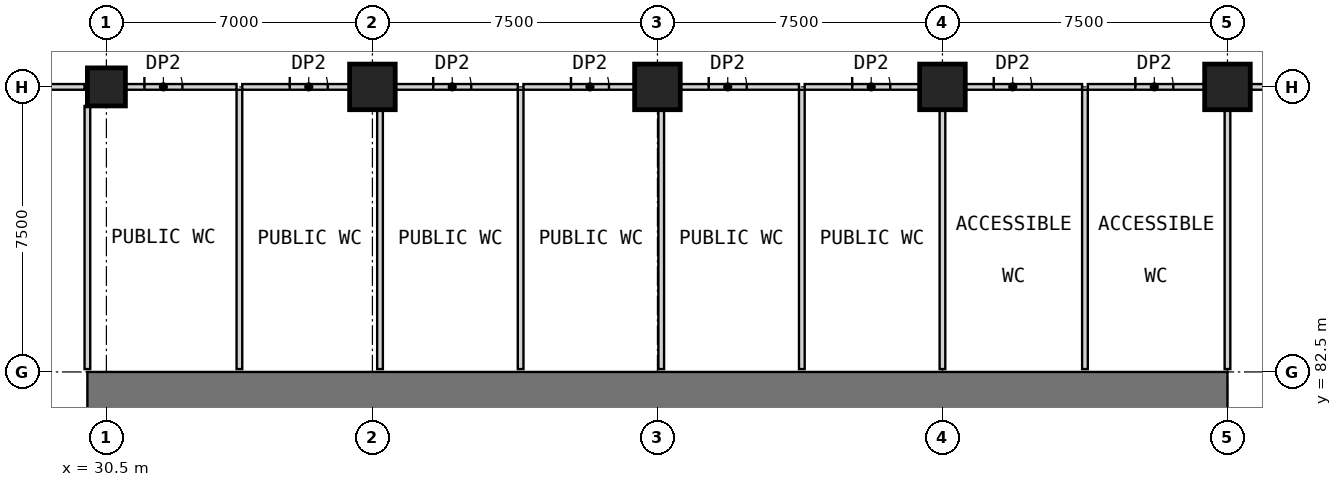
"""IFC4 building model, lengths in metres.
Left out: names, types, materials, properties, quantities, classifications, styles, units other than length and angle.
Written with IfcOpenShell. Run it as: python <this file> out.ifc"""

import sys

from ifc_helpers import new_model, si_unit, direction, frame, frame_2d, origin, origin_2d, place, context, subcontext, project, spatial, rectangle, extrude, element, fill, save


model = new_model("IFC4")
c1 = context("Model", 3, precision=1e-05, world=origin(), true_north=direction((0.0, 1.0)))
c2 = subcontext(c1, "Body", "Model", "MODEL_VIEW")
j1 = project(units=[si_unit("LENGTHUNIT", "METRE"), si_unit("PLANEANGLEUNIT", "RADIAN")], contexts=[c1])
p1 = place(None, origin())
s1 = spatial("IfcSite", under=j1, at=p1, CompositionType="ELEMENT")
p2 = place(p1, origin())
s2 = spatial("IfcBuilding", under=s1, at=p2, CompositionType="ELEMENT")
p3 = place(p2, frame((0.0, 0.0, 18.5)))
s3 = spatial("IfcBuildingStorey", under=s2, at=p3, CompositionType="ELEMENT", Elevation=18.5)
p4 = place(p3, frame((30.5, 90.0, 0.0), z_axis=(0.0, 0.0, 1.0), x_axis=(1.0, 0.0, 0.0)))
e1 = element("IfcColumn", 1, at=p4, inside=s3, PredefinedType="COLUMN", context=c2, shape_type="SweptSolid", body=[
    extrude(rectangle(XDim=1.0, YDim=1.0, at=origin_2d()), origin(), (0.0, 0.0, 1.0), 5.0),
])
for number, where, z_axis, x_axis in (
    (2, (37.5, 90.0, 0.0), (0.0, 0.0, 1.0), (1.0, 0.0, 0.0)),
    (3, (45.0, 90.0, 0.0), (0.0, 0.0, 1.0), (1.0, 0.0, 0.0)),
    (4, (52.5, 90.0, 0.0), (0.0, 0.0, 1.0), (1.0, 0.0, 0.0)),
    (5, (60.0, 90.0, 0.0), (0.0, 0.0, 1.0), (1.0, 0.0, 0.0)),
):
    element("IfcColumn", number, at=place(p3, frame(where, z_axis=z_axis, x_axis=x_axis)), inside=s3, PredefinedType="COLUMN", context=c2, shape_type="SweptSolid", body=[
        extrude(rectangle(XDim=1.2, YDim=1.2, at=origin_2d()), origin(), (0.0, 0.0, 1.0), 5.0),
    ])
p5 = place(p3, frame((30.0, 82.0, 0.0), z_axis=(0.0, 0.0, 1.0), x_axis=(1.0, 0.0, 0.0)))
e6 = element("IfcWall", 6, at=p5, inside=s3, PredefinedType="SHEAR", context=c2, shape_type="SweptSolid", body=[
    extrude(rectangle(XDim=30.0, YDim=1.0, at=frame_2d((15.0, 0.0))), origin(), (0.0, 0.0, 1.0), 5.0),
])
p6 = place(p3, frame((23.6, 90.0, 0.0), z_axis=(0.0, 0.0, 1.0), x_axis=(1.0, 0.0, 0.0)))
e7 = element("IfcWall", 7, at=p6, inside=s3, PredefinedType="PARTITIONING", context=c2, shape_type="SweptSolid", body=[
    extrude(rectangle(XDim=6.325, YDim=0.15, at=frame_2d((3.163, 0.0))), origin(), (0.0, 0.0, 1.0), 4.7),
])
p7 = place(p3, frame((31.0, 90.0, 0.0), z_axis=(0.0, 0.0, 1.0), x_axis=(1.0, 0.0, 0.0)))
e8 = element("IfcWall", 8, at=p7, inside=s3, PredefinedType="PARTITIONING", context=c2, shape_type="SweptSolid", body=[
    extrude(rectangle(XDim=2.925, YDim=0.15, at=frame_2d((1.462, 0.0))), origin(), (0.0, 0.0, 1.0), 4.7),
])
p8 = place(p7, frame((0.5, 0.0, 0.0)))
e9 = element("IfcOpeningElement", 9, at=p8, cuts=e8, PredefinedType="OPENING", context=c2, shape_type="SweptSolid", body=[
    extrude(rectangle(XDim=1.0, YDim=2.1, at=frame_2d((0.5, 1.05))), frame((0.0, 0.085, 0.0), z_axis=(0.0, -1.0, 0.0), x_axis=(1.0, 0.0, 0.0)), (0.0, 0.0, 1.0), 0.17),
])
p9 = place(p3, frame((34.075, 90.0, 0.0), z_axis=(0.0, 0.0, 1.0), x_axis=(1.0, 0.0, 0.0)))
e10 = element("IfcWall", 10, at=p9, inside=s3, PredefinedType="PARTITIONING", context=c2, shape_type="SweptSolid", body=[
    extrude(rectangle(XDim=2.825, YDim=0.15, at=frame_2d((1.413, 0.0))), origin(), (0.0, 0.0, 1.0), 4.7),
])
p10 = place(p9, frame((1.25, 0.0, 0.0)))
e11 = element("IfcOpeningElement", 11, at=p10, cuts=e10, PredefinedType="OPENING", context=c2, shape_type="SweptSolid", body=[
    extrude(rectangle(XDim=1.0, YDim=2.1, at=frame_2d((0.5, 1.05))), frame((0.0, 0.085, 0.0), z_axis=(0.0, -1.0, 0.0), x_axis=(1.0, 0.0, 0.0)), (0.0, 0.0, 1.0), 0.17),
])
p11 = place(p3, frame((38.1, 90.0, 0.0), z_axis=(0.0, 0.0, 1.0), x_axis=(1.0, 0.0, 0.0)))
e12 = element("IfcWall", 12, at=p11, inside=s3, PredefinedType="PARTITIONING", context=c2, shape_type="SweptSolid", body=[
    extrude(rectangle(XDim=3.225, YDim=0.15, at=frame_2d((1.612, 0.0))), origin(), (0.0, 0.0, 1.0), 4.7),
])
p12 = place(p11, frame((1.0, 0.0, 0.0)))
e13 = element("IfcOpeningElement", 13, at=p12, cuts=e12, PredefinedType="OPENING", context=c2, shape_type="SweptSolid", body=[
    extrude(rectangle(XDim=1.0, YDim=2.1, at=frame_2d((0.5, 1.05))), frame((0.0, 0.085, 0.0), z_axis=(0.0, -1.0, 0.0), x_axis=(1.0, 0.0, 0.0)), (0.0, 0.0, 1.0), 0.17),
])
p13 = place(p3, frame((41.475, 90.0, 0.0), z_axis=(0.0, 0.0, 1.0), x_axis=(1.0, 0.0, 0.0)))
e14 = element("IfcWall", 14, at=p13, inside=s3, PredefinedType="PARTITIONING", context=c2, shape_type="SweptSolid", body=[
    extrude(rectangle(XDim=2.925, YDim=0.15, at=frame_2d((1.462, 0.0))), origin(), (0.0, 0.0, 1.0), 4.7),
])
p14 = place(p13, frame((1.25, 0.0, 0.0)))
e15 = element("IfcOpeningElement", 15, at=p14, cuts=e14, PredefinedType="OPENING", context=c2, shape_type="SweptSolid", body=[
    extrude(rectangle(XDim=1.0, YDim=2.1, at=frame_2d((0.5, 1.05))), frame((0.0, 0.085, 0.0), z_axis=(0.0, -1.0, 0.0), x_axis=(1.0, 0.0, 0.0)), (0.0, 0.0, 1.0), 0.17),
])
p15 = place(p3, frame((45.6, 90.0, 0.0), z_axis=(0.0, 0.0, 1.0), x_axis=(1.0, 0.0, 0.0)))
e16 = element("IfcWall", 16, at=p15, inside=s3, PredefinedType="PARTITIONING", context=c2, shape_type="SweptSolid", body=[
    extrude(rectangle(XDim=3.125, YDim=0.15, at=frame_2d((1.562, 0.0))), origin(), (0.0, 0.0, 1.0), 4.7),
])
p16 = place(p15, frame((0.75, 0.0, 0.0)))
e17 = element("IfcOpeningElement", 17, at=p16, cuts=e16, PredefinedType="OPENING", context=c2, shape_type="SweptSolid", body=[
    extrude(rectangle(XDim=1.0, YDim=2.1, at=frame_2d((0.5, 1.05))), frame((0.0, 0.085, 0.0), z_axis=(0.0, -1.0, 0.0), x_axis=(1.0, 0.0, 0.0)), (0.0, 0.0, 1.0), 0.17),
])
p17 = place(p3, frame((48.875, 90.0, 0.0), z_axis=(0.0, 0.0, 1.0), x_axis=(1.0, 0.0, 0.0)))
e18 = element("IfcWall", 18, at=p17, inside=s3, PredefinedType="PARTITIONING", context=c2, shape_type="SweptSolid", body=[
    extrude(rectangle(XDim=3.025, YDim=0.15, at=frame_2d((1.512, 0.0))), origin(), (0.0, 0.0, 1.0), 4.7),
])
p18 = place(p17, frame((1.25, 0.0, 0.0)))
e19 = element("IfcOpeningElement", 19, at=p18, cuts=e18, PredefinedType="OPENING", context=c2, shape_type="SweptSolid", body=[
    extrude(rectangle(XDim=1.0, YDim=2.1, at=frame_2d((0.5, 1.05))), frame((0.0, 0.085, 0.0), z_axis=(0.0, -1.0, 0.0), x_axis=(1.0, 0.0, 0.0)), (0.0, 0.0, 1.0), 0.17),
])
p19 = place(p3, frame((53.1, 90.0, 0.0), z_axis=(0.0, 0.0, 1.0), x_axis=(1.0, 0.0, 0.0)))
e20 = element("IfcWall", 20, at=p19, inside=s3, PredefinedType="PARTITIONING", context=c2, shape_type="SweptSolid", body=[
    extrude(rectangle(XDim=3.075, YDim=0.15, at=frame_2d((1.538, 0.0))), origin(), (0.0, 0.0, 1.0), 4.7),
])
p20 = place(p19, frame((0.75, 0.0, 0.0)))
e21 = element("IfcOpeningElement", 21, at=p20, cuts=e20, PredefinedType="OPENING", context=c2, shape_type="SweptSolid", body=[
    extrude(rectangle(XDim=1.0, YDim=2.1, at=frame_2d((0.5, 1.05))), frame((0.0, 0.085, 0.0), z_axis=(0.0, -1.0, 0.0), x_axis=(1.0, 0.0, 0.0)), (0.0, 0.0, 1.0), 0.17),
])
p21 = place(p3, frame((56.325, 90.0, 0.0), z_axis=(0.0, 0.0, 1.0), x_axis=(1.0, 0.0, 0.0)))
e22 = element("IfcWall", 22, at=p21, inside=s3, PredefinedType="PARTITIONING", context=c2, shape_type="SweptSolid", body=[
    extrude(rectangle(XDim=3.075, YDim=0.15, at=frame_2d((1.538, 0.0))), origin(), (0.0, 0.0, 1.0), 4.7),
])
p22 = place(p21, frame((1.25, 0.0, 0.0)))
e23 = element("IfcOpeningElement", 23, at=p22, cuts=e22, PredefinedType="OPENING", context=c2, shape_type="SweptSolid", body=[
    extrude(rectangle(XDim=1.0, YDim=2.1, at=frame_2d((0.5, 1.05))), frame((0.0, 0.085, 0.0), z_axis=(0.0, -1.0, 0.0), x_axis=(1.0, 0.0, 0.0)), (0.0, 0.0, 1.0), 0.17),
])
p23 = place(p3, frame((60.6, 90.0, 0.0), z_axis=(0.0, 0.0, 1.0), x_axis=(1.0, 0.0, 0.0)))
e24 = element("IfcWall", 24, at=p23, inside=s3, PredefinedType="PARTITIONING", context=c2, shape_type="SweptSolid", body=[
    extrude(rectangle(XDim=6.3, YDim=0.15, at=frame_2d((3.15, 0.0))), origin(), (0.0, 0.0, 1.0), 4.7),
])
p24 = place(p23, frame((3.5, 0.0, 0.0)))
e25 = element("IfcOpeningElement", 25, at=p24, cuts=e24, PredefinedType="OPENING", context=c2, shape_type="SweptSolid", body=[
    extrude(rectangle(XDim=1.8, YDim=2.4, at=frame_2d((0.9, 1.2))), frame((0.0, 0.085, 0.0), z_axis=(0.0, -1.0, 0.0), x_axis=(1.0, 0.0, 0.0)), (0.0, 0.0, 1.0), 0.17),
])
p25 = place(p3, frame((56.25, 82.575, 0.0), z_axis=(0.0, 0.0, 1.0), x_axis=(0.0, 1.0, 0.0)))
e26 = element("IfcWall", 26, at=p25, inside=s3, PredefinedType="PARTITIONING", context=c2, shape_type="SweptSolid", body=[
    extrude(rectangle(XDim=7.35, YDim=0.15, at=frame_2d((3.675, 0.0))), origin(), (0.0, 0.0, 1.0), 4.7),
])
p26 = place(p3, frame((52.5, 82.575, 0.0), z_axis=(0.0, 0.0, 1.0), x_axis=(0.0, 1.0, 0.0)))
e27 = element("IfcWall", 27, at=p26, inside=s3, PredefinedType="PARTITIONING", context=c2, shape_type="SweptSolid", body=[
    extrude(rectangle(XDim=6.825, YDim=0.15, at=frame_2d((3.413, 0.0))), origin(), (0.0, 0.0, 1.0), 4.7),
])
p27 = place(p3, frame((34.0, 82.575, 0.0), z_axis=(0.0, 0.0, 1.0), x_axis=(0.0, 1.0, 0.0)))
e28 = element("IfcWall", 28, at=p27, inside=s3, PredefinedType="PARTITIONING", context=c2, shape_type="SweptSolid", body=[
    extrude(rectangle(XDim=7.35, YDim=0.15, at=frame_2d((3.675, 0.0))), origin(), (0.0, 0.0, 1.0), 4.7),
])
p28 = place(p3, frame((30.0, 82.575, 0.0), z_axis=(0.0, 0.0, 1.0), x_axis=(0.0, 1.0, 0.0)))
e29 = element("IfcWall", 29, at=p28, inside=s3, PredefinedType="PARTITIONING", context=c2, shape_type="SweptSolid", body=[
    extrude(rectangle(XDim=6.925, YDim=0.15, at=frame_2d((3.462, 0.0))), origin(), (0.0, 0.0, 1.0), 4.7),
])
p29 = place(p3, frame((37.7, 82.575, 0.0), z_axis=(0.0, 0.0, 1.0), x_axis=(0.0, 1.0, 0.0)))
e30 = element("IfcWall", 30, at=p29, inside=s3, PredefinedType="PARTITIONING", context=c2, shape_type="SweptSolid", body=[
    extrude(rectangle(XDim=6.825, YDim=0.15, at=frame_2d((3.413, 0.0))), origin(), (0.0, 0.0, 1.0), 4.7),
])
p30 = place(p3, frame((41.4, 82.575, 0.0), z_axis=(0.0, 0.0, 1.0), x_axis=(0.0, 1.0, 0.0)))
e31 = element("IfcWall", 31, at=p30, inside=s3, PredefinedType="PARTITIONING", context=c2, shape_type="SweptSolid", body=[
    extrude(rectangle(XDim=7.35, YDim=0.15, at=frame_2d((3.675, 0.0))), origin(), (0.0, 0.0, 1.0), 4.7),
])
p31 = place(p3, frame((45.1, 82.575, 0.0), z_axis=(0.0, 0.0, 1.0), x_axis=(0.0, 1.0, 0.0)))
e32 = element("IfcWall", 32, at=p31, inside=s3, PredefinedType="PARTITIONING", context=c2, shape_type="SweptSolid", body=[
    extrude(rectangle(XDim=6.825, YDim=0.15, at=frame_2d((3.413, 0.0))), origin(), (0.0, 0.0, 1.0), 4.7),
])
p32 = place(p3, frame((48.8, 82.575, 0.0), z_axis=(0.0, 0.0, 1.0), x_axis=(0.0, 1.0, 0.0)))
e33 = element("IfcWall", 33, at=p32, inside=s3, PredefinedType="PARTITIONING", context=c2, shape_type="SweptSolid", body=[
    extrude(rectangle(XDim=7.35, YDim=0.15, at=frame_2d((3.675, 0.0))), origin(), (0.0, 0.0, 1.0), 4.7),
])
p33 = place(p3, frame((60.0, 82.575, 0.0), z_axis=(0.0, 0.0, 1.0), x_axis=(0.0, 1.0, 0.0)))
e34 = element("IfcWall", 34, at=p33, inside=s3, PredefinedType="PARTITIONING", context=c2, shape_type="SweptSolid", body=[
    extrude(rectangle(XDim=6.825, YDim=0.15, at=frame_2d((3.413, 0.0))), origin(), (0.0, 0.0, 1.0), 4.7),
])
p34 = place(p8, origin())
e35 = element("IfcDoor", 35, at=p34, inside=s3, OperationType="SINGLE_SWING_LEFT", PredefinedType="DOOR", context=c2, shape_type="SweptSolid", body=[
    extrude(rectangle(XDim=1.0, YDim=2.1, at=frame_2d((0.5, 1.05))), frame((0.0, 0.025, 0.0), z_axis=(0.0, -1.0, 0.0), x_axis=(1.0, 0.0, 0.0)), (0.0, 0.0, 1.0), 0.05),
])
fill(e9, e35)
p35 = place(p10, origin())
e36 = element("IfcDoor", 36, at=p35, inside=s3, OperationType="SINGLE_SWING_LEFT", PredefinedType="DOOR", context=c2, shape_type="SweptSolid", body=[
    extrude(rectangle(XDim=1.0, YDim=2.1, at=frame_2d((0.5, 1.05))), frame((0.0, 0.025, 0.0), z_axis=(0.0, -1.0, 0.0), x_axis=(1.0, 0.0, 0.0)), (0.0, 0.0, 1.0), 0.05),
])
fill(e11, e36)
p36 = place(p12, origin())
e37 = element("IfcDoor", 37, at=p36, inside=s3, OperationType="SINGLE_SWING_LEFT", PredefinedType="DOOR", context=c2, shape_type="SweptSolid", body=[
    extrude(rectangle(XDim=1.0, YDim=2.1, at=frame_2d((0.5, 1.05))), frame((0.0, 0.025, 0.0), z_axis=(0.0, -1.0, 0.0), x_axis=(1.0, 0.0, 0.0)), (0.0, 0.0, 1.0), 0.05),
])
fill(e13, e37)
p37 = place(p14, origin())
e38 = element("IfcDoor", 38, at=p37, inside=s3, OperationType="SINGLE_SWING_LEFT", PredefinedType="DOOR", context=c2, shape_type="SweptSolid", body=[
    extrude(rectangle(XDim=1.0, YDim=2.1, at=frame_2d((0.5, 1.05))), frame((0.0, 0.025, 0.0), z_axis=(0.0, -1.0, 0.0), x_axis=(1.0, 0.0, 0.0)), (0.0, 0.0, 1.0), 0.05),
])
fill(e15, e38)
p38 = place(p16, origin())
e39 = element("IfcDoor", 39, at=p38, inside=s3, OperationType="SINGLE_SWING_LEFT", PredefinedType="DOOR", context=c2, shape_type="SweptSolid", body=[
    extrude(rectangle(XDim=1.0, YDim=2.1, at=frame_2d((0.5, 1.05))), frame((0.0, 0.025, 0.0), z_axis=(0.0, -1.0, 0.0), x_axis=(1.0, 0.0, 0.0)), (0.0, 0.0, 1.0), 0.05),
])
fill(e17, e39)
p39 = place(p18, origin())
e40 = element("IfcDoor", 40, at=p39, inside=s3, OperationType="SINGLE_SWING_LEFT", PredefinedType="DOOR", context=c2, shape_type="SweptSolid", body=[
    extrude(rectangle(XDim=1.0, YDim=2.1, at=frame_2d((0.5, 1.05))), frame((0.0, 0.025, 0.0), z_axis=(0.0, -1.0, 0.0), x_axis=(1.0, 0.0, 0.0)), (0.0, 0.0, 1.0), 0.05),
])
fill(e19, e40)
p40 = place(p20, origin())
e41 = element("IfcDoor", 41, at=p40, inside=s3, OperationType="SINGLE_SWING_LEFT", PredefinedType="DOOR", context=c2, shape_type="SweptSolid", body=[
    extrude(rectangle(XDim=1.0, YDim=2.1, at=frame_2d((0.5, 1.05))), frame((0.0, 0.025, 0.0), z_axis=(0.0, -1.0, 0.0), x_axis=(1.0, 0.0, 0.0)), (0.0, 0.0, 1.0), 0.05),
])
fill(e21, e41)
p41 = place(p22, origin())
e42 = element("IfcDoor", 42, at=p41, inside=s3, OperationType="SINGLE_SWING_LEFT", PredefinedType="DOOR", context=c2, shape_type="SweptSolid", body=[
    extrude(rectangle(XDim=1.0, YDim=2.1, at=frame_2d((0.5, 1.05))), frame((0.0, 0.025, 0.0), z_axis=(0.0, -1.0, 0.0), x_axis=(1.0, 0.0, 0.0)), (0.0, 0.0, 1.0), 0.05),
])
fill(e23, e42)
save(model, sys.argv[1])
